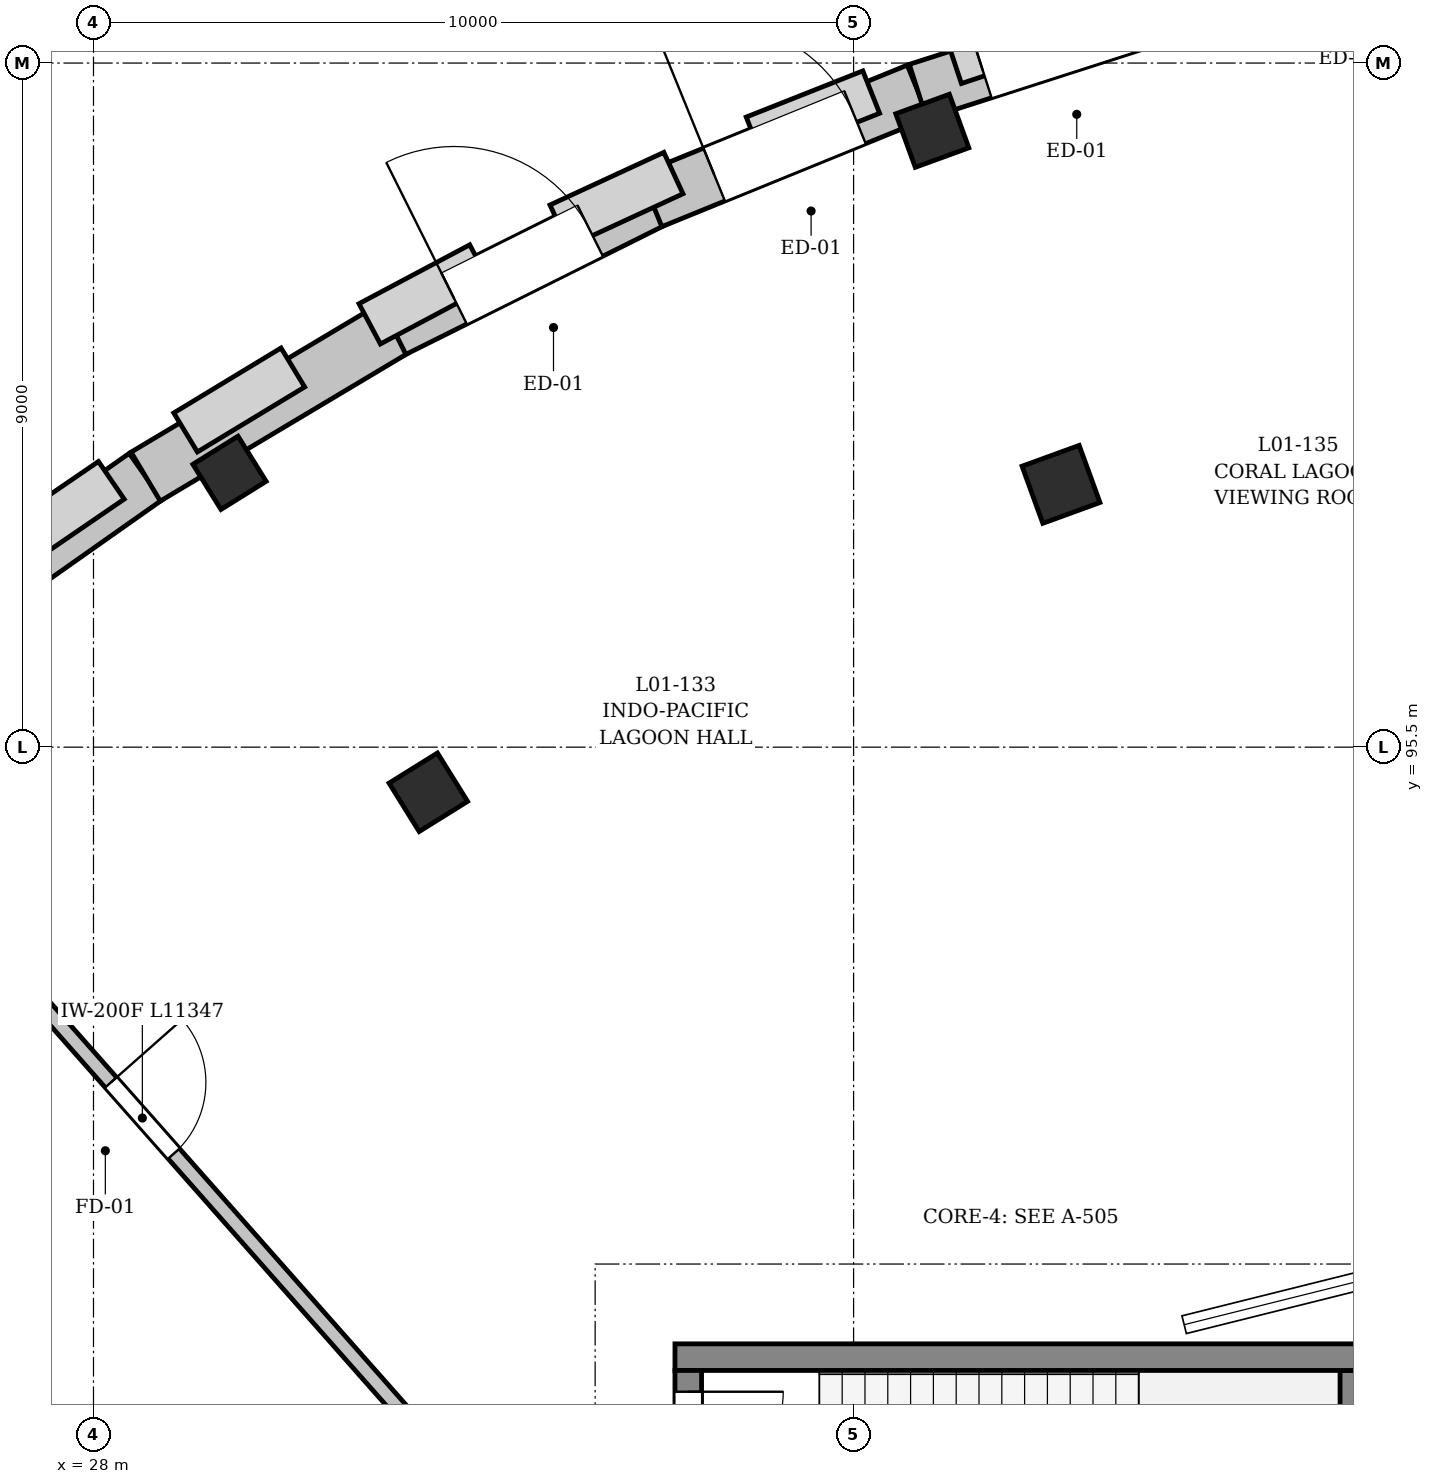
"""IFC4 building model, lengths in metres.
Left out: names, types, materials, properties, quantities, classifications, styles, units other than length and angle.
Written with IfcOpenShell. Run it as: python <this file> out.ifc"""

import sys

from ifc_helpers import new_model, si_unit, direction, frame, frame_2d, origin, origin_2d, place, context, subcontext, project, spatial, rectangle, extrude, element, fill, save


model = new_model("IFC4")
c1 = context("Model", 3, precision=1e-05, world=origin(), true_north=direction((0.0, 1.0)))
c2 = subcontext(c1, "Body", "Model", "MODEL_VIEW")
j1 = project(units=[si_unit("LENGTHUNIT", "METRE"), si_unit("PLANEANGLEUNIT", "RADIAN")], contexts=[c1])
p1 = place(None, origin())
s1 = spatial("IfcSite", under=j1, at=p1, CompositionType="ELEMENT")
p2 = place(p1, origin())
s2 = spatial("IfcBuilding", under=s1, at=p2, CompositionType="ELEMENT")
p3 = place(p2, origin())
s3 = spatial("IfcBuildingStorey", under=s2, at=p3, CompositionType="ELEMENT", Elevation=0.0)
p4 = place(p3, frame((40.729, 98.957, 0.0), z_axis=(0.0, 0.0, 1.0), x_axis=(-0.342020143326, 0.939692620786, 0.0)))
e1 = element("IfcColumn", 1, at=p4, inside=s3, PredefinedType="COLUMN", context=c2, shape_type="SweptSolid", body=[
    extrude(rectangle(XDim=0.8, YDim=0.8, at=origin_2d()), origin(), (0.0, 0.0, 1.0), 5.1),
])
for number, where, z_axis, x_axis in (
    (2, (39.036, 103.609, 0.0), (0.0, 0.0, 1.0), (-0.342, 0.94, 0.0)),
    (3, (32.405, 94.906, 0.0), (0.0, 0.0, 1.0), (-0.528, 0.849, 0.0)),
):
    element("IfcColumn", number, at=place(p3, frame(where, z_axis=z_axis, x_axis=x_axis)), inside=s3, PredefinedType="COLUMN", context=c2, shape_type="SweptSolid", body=[
        extrude(rectangle(XDim=0.75, YDim=0.75, at=origin_2d()), origin(), (0.0, 0.0, 1.0), 5.1),
    ])
p5 = place(p3, frame((29.79, 99.109, 0.0), z_axis=(0.0, 0.0, 1.0), x_axis=(-0.528438334722, 0.848971687629, 0.0)))
e4 = element("IfcColumn", 4, at=p5, inside=s3, PredefinedType="COLUMN", context=c2, shape_type="SweptSolid", body=[
    extrude(rectangle(XDim=0.7, YDim=0.7, at=origin_2d()), origin(), (0.0, 0.0, 1.0), 5.1),
])
p6 = place(p3, frame((21.777, 89.409, 0.0), z_axis=(0.0, 0.0, 1.0), x_axis=(0.719341564929, -0.694656543168, 0.0)))
e5 = element("IfcWall", 5, at=p6, inside=s3, PredefinedType="SOLIDWALL", context=c2, shape_type="SweptSolid", body=[
    extrude(rectangle(XDim=8.288, YDim=0.52, at=frame_2d((4.144, 0.0))), origin(), (0.0, 0.0, 1.0), 5.1),
])
p7 = place(p6, frame((3.169, 0.0, 0.9)))
e6 = element("IfcOpeningElement", 6, at=p7, cuts=e5, PredefinedType="OPENING", context=c2, shape_type="SweptSolid", body=[
    extrude(rectangle(XDim=1.95, YDim=2.0, at=frame_2d((0.975, 1.0))), frame((0.0, 0.27, 0.0), z_axis=(0.0, -1.0, 0.0), x_axis=(1.0, 0.0, 0.0)), (0.0, 0.0, 1.0), 0.54),
])
p8 = place(p3, frame((33.66, 79.213, 0.0), z_axis=(0.0, 0.0, 1.0), x_axis=(-0.719335980864, 0.694662325619, 0.0)))
e7 = element("IfcWall", 7, at=p8, inside=s3, PredefinedType="SOLIDWALL", context=c2, shape_type="SweptSolid", body=[
    extrude(rectangle(XDim=18.632, YDim=0.52, at=frame_2d((9.316, 0.0))), origin(), (0.0, 0.0, 1.0), 5.1),
])
p9 = place(p8, frame((3.066, 0.0, 0.9)))
e8 = element("IfcOpeningElement", 8, at=p9, cuts=e7, PredefinedType="OPENING", context=c2, shape_type="SweptSolid", body=[
    extrude(rectangle(XDim=1.7, YDim=1.55, at=frame_2d((0.85, 0.775))), frame((0.0, 0.27, 0.0), z_axis=(0.0, -1.0, 0.0), x_axis=(1.0, 0.0, 0.0)), (0.0, 0.0, 1.0), 0.54),
])
p10 = place(p8, frame((6.666, 0.0, 0.9)))
e9 = element("IfcOpeningElement", 9, at=p10, cuts=e7, PredefinedType="OPENING", context=c2, shape_type="SweptSolid", body=[
    extrude(rectangle(XDim=1.7, YDim=1.55, at=frame_2d((0.85, 0.775))), frame((0.0, 0.27, 0.0), z_axis=(0.0, -1.0, 0.0), x_axis=(1.0, 0.0, 0.0)), (0.0, 0.0, 1.0), 0.54),
])
p11 = place(p8, frame((10.266, 0.0, 0.9)))
e10 = element("IfcOpeningElement", 10, at=p11, cuts=e7, PredefinedType="OPENING", context=c2, shape_type="SweptSolid", body=[
    extrude(rectangle(XDim=1.7, YDim=1.55, at=frame_2d((0.85, 0.775))), frame((0.0, 0.27, 0.0), z_axis=(0.0, -1.0, 0.0), x_axis=(1.0, 0.0, 0.0)), (0.0, 0.0, 1.0), 0.54),
])
p12 = place(p8, frame((13.446, 0.0, 0.9)))
e11 = element("IfcOpeningElement", 11, at=p12, cuts=e7, PredefinedType="OPENING", context=c2, shape_type="SweptSolid", body=[
    extrude(rectangle(XDim=1.7, YDim=1.55, at=frame_2d((0.85, 0.775))), frame((0.0, 0.27, 0.0), z_axis=(0.0, -1.0, 0.0), x_axis=(1.0, 0.0, 0.0)), (0.0, 0.0, 1.0), 0.54),
])
p13 = place(p3, frame((25.587, 96.875, 0.0), z_axis=(0.0, 0.0, 1.0), x_axis=(0.817470720904, 0.57597015588, 0.0)))
e12 = element("IfcWall", 12, at=p13, inside=s3, PredefinedType="SOLIDWALL", context=c2, shape_type="SweptSolid", body=[
    extrude(rectangle(XDim=3.792, YDim=0.75, at=frame_2d((1.896, 0.0))), origin(), (0.0, 0.0, 1.0), 5.1),
])
p14 = place(p3, frame((28.687, 99.059, 0.0), z_axis=(0.0, 0.0, 1.0), x_axis=(0.858644028079, 0.512572368592, 0.0)))
e13 = element("IfcWall", 13, at=p14, inside=s3, PredefinedType="SOLIDWALL", context=c2, shape_type="SweptSolid", body=[
    extrude(rectangle(XDim=3.792, YDim=0.75, at=frame_2d((1.896, 0.0))), origin(), (0.0, 0.0, 1.0), 4.09),
])
p15 = place(p3, frame((31.942, 101.003, 0.0), z_axis=(0.0, 0.0, 1.0), x_axis=(0.89495448859, 0.446157442337, 0.0)))
e14 = element("IfcWall", 14, at=p15, inside=s3, PredefinedType="SOLIDWALL", context=c2, shape_type="SweptSolid", body=[
    extrude(rectangle(XDim=3.792, YDim=0.75, at=frame_2d((1.896, 0.0))), origin(), (0.0, 0.0, 1.0), 5.1),
])
p16 = place(p15, frame((0.896, 0.0, 0.0)))
e15 = element("IfcOpeningElement", 15, at=p16, cuts=e14, PredefinedType="OPENING", context=c2, shape_type="SweptSolid", body=[
    extrude(rectangle(XDim=2.0, YDim=2.5, at=frame_2d((1.0, 1.25))), frame((0.0, 0.385, 0.0), z_axis=(0.0, -1.0, 0.0), x_axis=(1.0, 0.0, 0.0)), (0.0, 0.0, 1.0), 0.77),
])
p17 = place(p3, frame((35.336, 102.695, 0.0), z_axis=(0.0, 0.0, 1.0), x_axis=(0.92607319541, 0.377343923686, 0.0)))
e16 = element("IfcWall", 16, at=p17, inside=s3, PredefinedType="SOLIDWALL", context=c2, shape_type="SweptSolid", body=[
    extrude(rectangle(XDim=3.792, YDim=0.75, at=frame_2d((1.896, 0.0))), origin(), (0.0, 0.0, 1.0), 4.09),
])
p18 = place(p17, frame((0.896, 0.0, 0.0)))
e17 = element("IfcOpeningElement", 17, at=p18, cuts=e16, PredefinedType="OPENING", context=c2, shape_type="SweptSolid", body=[
    extrude(rectangle(XDim=2.0, YDim=2.5, at=frame_2d((1.0, 1.25))), frame((0.0, 0.385, 0.0), z_axis=(0.0, -1.0, 0.0), x_axis=(1.0, 0.0, 0.0)), (0.0, 0.0, 1.0), 0.77),
])
p19 = place(p3, frame((38.848, 104.125, 0.0), z_axis=(0.0, 0.0, 1.0), x_axis=(0.951959535224, 0.306223845081, 0.0)))
e18 = element("IfcWall", 18, at=p19, inside=s3, PredefinedType="SOLIDWALL", context=c2, shape_type="SweptSolid", body=[
    extrude(rectangle(XDim=3.792, YDim=0.75, at=frame_2d((1.896, 0.0))), origin(), (0.0, 0.0, 1.0), 4.09),
])
p20 = place(p19, frame((0.896, 0.0, 0.0)))
e19 = element("IfcOpeningElement", 19, at=p20, cuts=e18, PredefinedType="OPENING", context=c2, shape_type="SweptSolid", body=[
    extrude(rectangle(XDim=2.0, YDim=2.5, at=frame_2d((1.0, 1.25))), frame((0.0, 0.385, 0.0), z_axis=(0.0, -1.0, 0.0), x_axis=(1.0, 0.0, 0.0)), (0.0, 0.0, 1.0), 0.77),
])
p21 = place(p3, frame((44.575, 84.0, 0.0), z_axis=(0.0, 0.0, 1.0), x_axis=(0.0, 1.0, 0.0)))
e20 = element("IfcWall", 20, at=p21, inside=s3, PredefinedType="SHEAR", context=c2, shape_type="SweptSolid", body=[
    extrude(rectangle(XDim=3.3, YDim=0.35, at=frame_2d((1.65, 0.0))), origin(), (0.0, 0.0, 1.0), 5.1),
])
p22 = place(p3, frame((44.75, 87.475, 0.0), z_axis=(0.0, 0.0, 1.0), x_axis=(-1.0, 0.0, 0.0)))
e21 = element("IfcWall", 21, at=p22, inside=s3, PredefinedType="SHEAR", context=c2, shape_type="SweptSolid", body=[
    extrude(rectangle(XDim=9.1, YDim=0.35, at=frame_2d((4.55, 0.0))), origin(), (0.0, 0.0, 1.0), 5.1),
])
p23 = place(p3, frame((35.825, 87.3, 0.0), z_axis=(0.0, 0.0, 1.0), x_axis=(0.0, -1.0, 0.0)))
e22 = element("IfcWall", 22, at=p23, inside=s3, PredefinedType="SHEAR", context=c2, shape_type="SweptSolid", body=[
    extrude(rectangle(XDim=3.3, YDim=0.35, at=frame_2d((1.65, 0.0))), origin(), (0.0, 0.0, 1.0), 5.1),
])
p24 = place(p23, frame((0.28, 0.0, 0.0)))
e23 = element("IfcOpeningElement", 23, at=p24, cuts=e22, PredefinedType="OPENING", context=c2, shape_type="SweptSolid", body=[
    extrude(rectangle(XDim=1.25, YDim=2.2, at=frame_2d((0.625, 1.1))), frame((0.0, 0.185, 0.0), z_axis=(0.0, -1.0, 0.0), x_axis=(1.0, 0.0, 0.0)), (0.0, 0.0, 1.0), 0.37),
])
p25 = place(p3, frame((24.886, 94.872, 0.0), z_axis=(0.0, 0.0, 1.0), x_axis=(0.66223769238, -0.749293826741, 0.0)))
e24 = element("IfcWall", 24, at=p25, inside=s3, PredefinedType="PARTITIONING", context=c2, shape_type="SweptSolid", body=[
    extrude(rectangle(XDim=11.347, YDim=0.2, at=frame_2d((5.673, 0.0))), origin(), (0.0, 0.0, 1.0), 4.41),
])
p26 = place(p25, frame((5.048, 0.0, 0.0)))
e25 = element("IfcOpeningElement", 25, at=p26, cuts=e24, PredefinedType="OPENING", context=c2, shape_type="SweptSolid", body=[
    extrude(rectangle(XDim=1.25, YDim=2.2, at=frame_2d((0.625, 1.1))), frame((0.0, 0.11, 0.0), z_axis=(0.0, -1.0, 0.0), x_axis=(1.0, 0.0, 0.0)), (0.0, 0.0, 1.0), 0.22),
])
p27 = place(p16, origin())
e26 = element("IfcDoor", 26, at=p27, inside=s3, OperationType="DOUBLE_DOOR_SINGLE_SWING", PredefinedType="DOOR", context=c2, shape_type="SweptSolid", body=[
    extrude(rectangle(XDim=2.0, YDim=2.5, at=frame_2d((1.0, 1.25))), frame((0.0, 0.025, 0.0), z_axis=(0.0, -1.0, 0.0), x_axis=(1.0, 0.0, 0.0)), (0.0, 0.0, 1.0), 0.05),
])
fill(e15, e26)
p28 = place(p18, origin())
e27 = element("IfcDoor", 27, at=p28, inside=s3, OperationType="DOUBLE_DOOR_SINGLE_SWING", PredefinedType="DOOR", context=c2, shape_type="SweptSolid", body=[
    extrude(rectangle(XDim=2.0, YDim=2.5, at=frame_2d((1.0, 1.25))), frame((0.0, 0.025, 0.0), z_axis=(0.0, -1.0, 0.0), x_axis=(1.0, 0.0, 0.0)), (0.0, 0.0, 1.0), 0.05),
])
fill(e17, e27)
p29 = place(p20, origin())
e28 = element("IfcDoor", 28, at=p29, inside=s3, OperationType="DOUBLE_DOOR_SINGLE_SWING", PredefinedType="DOOR", context=c2, shape_type="SweptSolid", body=[
    extrude(rectangle(XDim=2.0, YDim=2.5, at=frame_2d((1.0, 1.25))), frame((0.0, 0.025, 0.0), z_axis=(0.0, -1.0, 0.0), x_axis=(1.0, 0.0, 0.0)), (0.0, 0.0, 1.0), 0.05),
])
fill(e19, e28)
p30 = place(p24, origin())
e29 = element("IfcDoor", 29, at=p30, inside=s3, OperationType="SINGLE_SWING_RIGHT", PredefinedType="DOOR", context=c2, shape_type="SweptSolid", body=[
    extrude(rectangle(XDim=1.25, YDim=2.2, at=frame_2d((0.625, 1.1))), frame((0.0, 0.025, 0.0), z_axis=(0.0, -1.0, 0.0), x_axis=(1.0, 0.0, 0.0)), (0.0, 0.0, 1.0), 0.05),
])
fill(e23, e29)
p31 = place(p26, origin())
e30 = element("IfcDoor", 30, at=p31, inside=s3, OperationType="SINGLE_SWING_LEFT", PredefinedType="DOOR", context=c2, shape_type="SweptSolid", body=[
    extrude(rectangle(XDim=1.25, YDim=2.2, at=frame_2d((0.625, 1.1))), frame((0.0, 0.025, 0.0), z_axis=(0.0, -1.0, 0.0), x_axis=(1.0, 0.0, 0.0)), (0.0, 0.0, 1.0), 0.05),
])
fill(e25, e30)
save(model, sys.argv[1])
